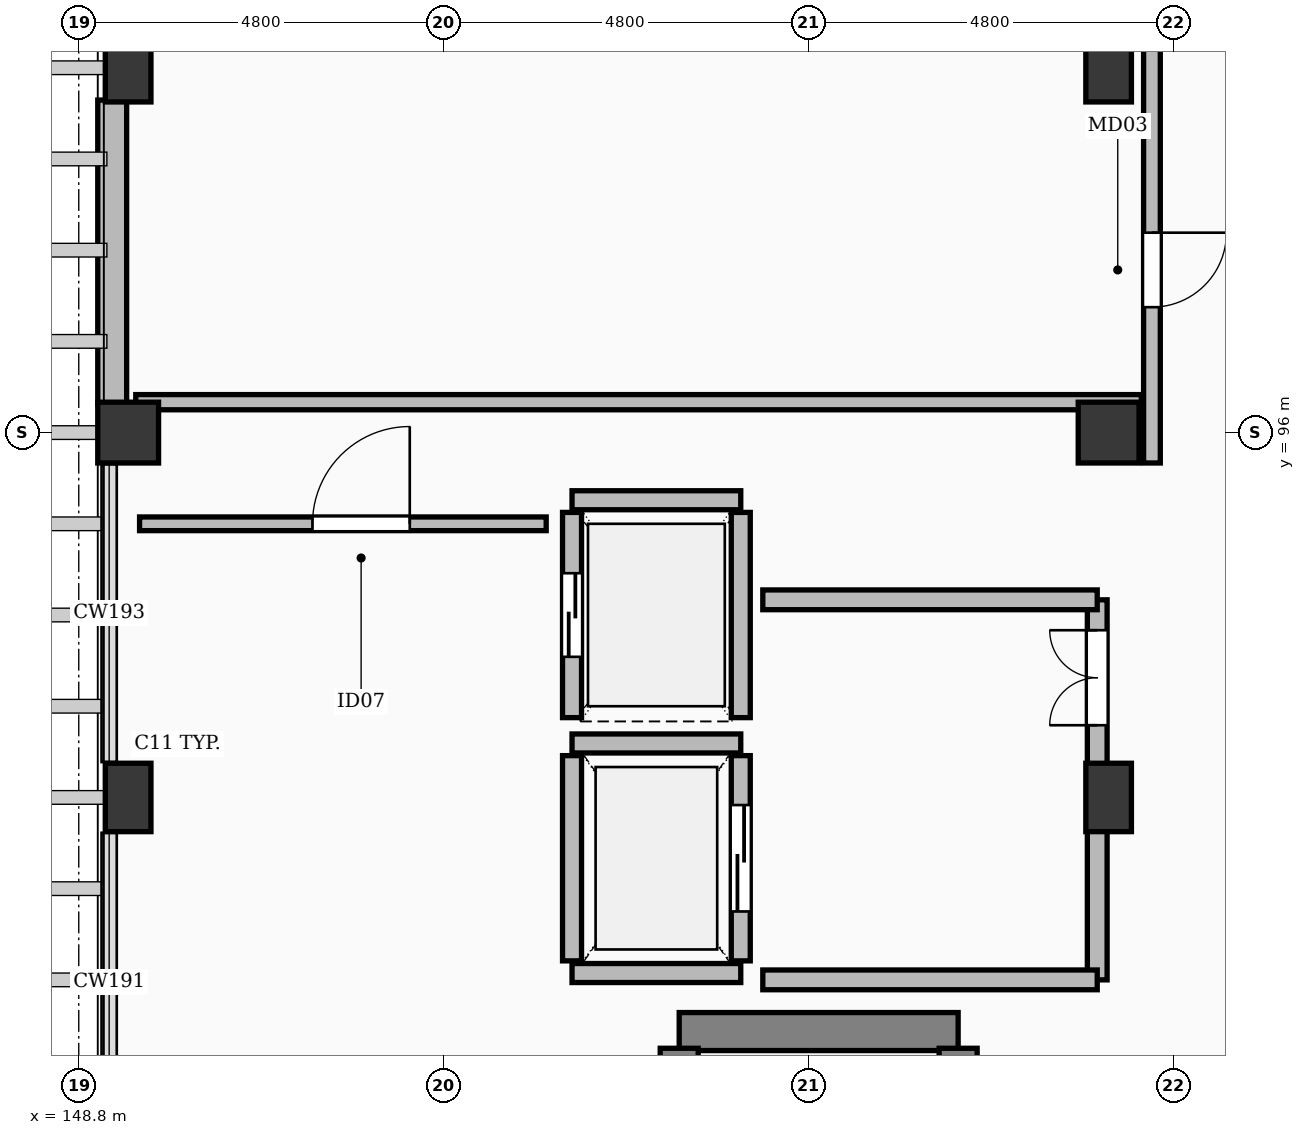
"""IFC4 building model, lengths in metres.
Left out: names, types, materials, properties, quantities, classifications, styles, units other than length and angle.
Written with IfcOpenShell. Run it as: python <this file> out.ifc"""

import sys

from ifc_helpers import new_model, si_unit, direction, frame, frame_2d, origin, origin_2d, place, context, subcontext, project, spatial, rectangle, extrude, element, fill, save


model = new_model("IFC4")
c1 = context("Model", 3, precision=1e-05, world=origin(), true_north=direction((0.0, 1.0)))
c2 = subcontext(c1, "Body", "Model", "MODEL_VIEW")
j1 = project(units=[si_unit("LENGTHUNIT", "METRE"), si_unit("PLANEANGLEUNIT", "RADIAN")], contexts=[c1])
p1 = place(None, origin())
s1 = spatial("IfcSite", under=j1, at=p1, CompositionType="ELEMENT")
p2 = place(p1, origin())
s2 = spatial("IfcBuilding", under=s1, at=p2, CompositionType="ELEMENT")
p3 = place(p2, frame((0.0, 0.0, 21.0)))
s3 = spatial("IfcBuildingStorey", under=s2, at=p3, CompositionType="ELEMENT", Elevation=21.0)
for number, where, z_axis, x_axis in (
    (1, (149.45, 96.0, 0.0), (0.0, 0.0, 1.0), (1.0, 0.0, 0.0)),
    (2, (162.35, 96.0, 0.0), (0.0, 0.0, 1.0), (1.0, 0.0, 0.0)),
):
    element("IfcColumn", number, at=place(p3, frame(where, z_axis=z_axis, x_axis=x_axis)), inside=s3, PredefinedType="COLUMN", context=c2, shape_type="SweptSolid", body=[
        extrude(rectangle(XDim=0.8, YDim=0.8, at=origin_2d()), origin(), (0.0, 0.0, 1.0), 3.6),
    ])
for number, where, z_axis, x_axis in (
    (3, (149.45, 91.2, -0.26), (0.0, 0.0, 1.0), (1.0, 0.0, 0.0)),
    (4, (149.45, 100.8, -0.26), (0.0, 0.0, 1.0), (1.0, 0.0, 0.0)),
    (5, (162.35, 91.2, -0.26), (0.0, 0.0, 1.0), (1.0, 0.0, 0.0)),
    (6, (162.35, 100.8, -0.26), (0.0, 0.0, 1.0), (1.0, 0.0, 0.0)),
):
    element("IfcColumn", number, at=place(p3, frame(where, z_axis=z_axis, x_axis=x_axis)), inside=s3, PredefinedType="COLUMN", context=c2, shape_type="SweptSolid", body=[
        extrude(rectangle(XDim=0.6, YDim=0.9, at=origin_2d()), origin(), (0.0, 0.0, 1.0), 3.86),
    ])
p4 = place(p3, frame((149.24, 96.375, 0.0), z_axis=(0.0, 0.0, 1.0), x_axis=(0.0, 1.0, 0.0)))
e7 = element("IfcWall", 7, at=p4, inside=s3, PredefinedType="SOLIDWALL", context=c2, shape_type="SweptSolid", body=[
    extrude(rectangle(XDim=4.0, YDim=0.38, at=frame_2d((2.0, 0.0))), origin(), (0.0, 0.0, 1.0), 2.652),
])
p5 = place(p3, frame((156.7, 88.12, 0.0), z_axis=(0.0, 0.0, 1.0), x_axis=(1.0, 0.0, 0.0)))
e8 = element("IfcWall", 8, at=p5, inside=s3, PredefinedType="SHEAR", context=c2, shape_type="SweptSolid", body=[
    extrude(rectangle(XDim=3.67, YDim=0.5, at=frame_2d((1.835, 0.0))), origin(), (0.0, 0.0, 1.0), 3.34),
])
p6 = place(p3, frame((156.7, 77.4, 0.0), z_axis=(0.0, 0.0, 1.0), x_axis=(0.0, 1.0, 0.0)))
e9 = element("IfcWall", 9, at=p6, inside=s3, PredefinedType="SHEAR", context=c2, shape_type="SweptSolid", body=[
    extrude(rectangle(XDim=10.5, YDim=0.5, at=frame_2d((5.25, 0.0))), origin(), (0.0, 0.0, 1.0), 3.34),
])
p7 = place(p3, frame((160.37, 77.4, 0.0), z_axis=(0.0, 0.0, 1.0), x_axis=(0.0, 1.0, 0.0)))
e10 = element("IfcWall", 10, at=p7, inside=s3, PredefinedType="SHEAR", context=c2, shape_type="SweptSolid", body=[
    extrude(rectangle(XDim=10.5, YDim=0.5, at=frame_2d((5.25, 0.0))), origin(), (0.0, 0.0, 1.0), 3.34),
])
p8 = place(p7, frame((0.45, 0.0, 0.0)))
e11 = element("IfcOpeningElement", 11, at=p8, cuts=e10, PredefinedType="OPENING", context=c2, shape_type="SweptSolid", body=[
    extrude(rectangle(XDim=1.3, YDim=2.15, at=frame_2d((0.65, 1.075))), frame((0.0, 0.262, 0.0), z_axis=(0.0, -1.0, 0.0), x_axis=(1.0, 0.0, 0.0)), (0.0, 0.0, 1.0), 0.524),
])
for number, where, z_axis, x_axis in (
    (12, (155.29, 88.89, 0.0), (0.0, 0.0, 1.0), (1.0, 0.0, 0.0)),
    (13, (155.29, 91.91, 0.0), (0.0, 0.0, 1.0), (1.0, 0.0, 0.0)),
):
    element("IfcWall", number, at=place(p3, frame(where, z_axis=z_axis, x_axis=x_axis)), inside=s3, PredefinedType="SOLIDWALL", context=c2, shape_type="SweptSolid", body=[
        extrude(rectangle(XDim=2.22, YDim=0.25, at=frame_2d((1.11, 0.0))), origin(), (0.0, 0.0, 1.0), 3.34),
    ])
p9 = place(p3, frame((155.29, 89.05, 0.0), z_axis=(0.0, 0.0, 1.0), x_axis=(0.0, 1.0, 0.0)))
e14 = element("IfcWall", 14, at=p9, inside=s3, PredefinedType="SOLIDWALL", context=c2, shape_type="SweptSolid", body=[
    extrude(rectangle(XDim=2.7, YDim=0.25, at=frame_2d((1.35, 0.0))), origin(), (0.0, 0.0, 1.0), 2.652),
])
p10 = place(p3, frame((157.51, 89.05, 0.0), z_axis=(0.0, 0.0, 1.0), x_axis=(0.0, 1.0, 0.0)))
e15 = element("IfcWall", 15, at=p10, inside=s3, PredefinedType="SOLIDWALL", context=c2, shape_type="SweptSolid", body=[
    extrude(rectangle(XDim=2.7, YDim=0.25, at=frame_2d((1.35, 0.0))), origin(), (0.0, 0.0, 1.0), 2.652),
])
p11 = place(p10, frame((0.65, 0.0, 0.0)))
e16 = element("IfcOpeningElement", 16, at=p11, cuts=e15, PredefinedType="OPENING", context=c2, shape_type="SweptSolid", body=[
    extrude(rectangle(XDim=1.4, YDim=2.3, at=frame_2d((0.7, 1.15))), frame((0.0, 0.137, 0.0), z_axis=(0.0, -1.0, 0.0), x_axis=(1.0, 0.0, 0.0)), (0.0, 0.0, 1.0), 0.274),
])
p12 = place(p3, frame((155.29, 95.11, 0.0), z_axis=(0.0, 0.0, 1.0), x_axis=(1.0, 0.0, 0.0)))
e17 = element("IfcWall", 17, at=p12, inside=s3, PredefinedType="SOLIDWALL", context=c2, shape_type="SweptSolid", body=[
    extrude(rectangle(XDim=2.22, YDim=0.25, at=frame_2d((1.11, 0.0))), origin(), (0.0, 0.0, 1.0), 3.34),
])
p13 = place(p3, frame((155.29, 92.25, 0.0), z_axis=(0.0, 0.0, 1.0), x_axis=(0.0, 1.0, 0.0)))
e18 = element("IfcWall", 18, at=p13, inside=s3, PredefinedType="SOLIDWALL", context=c2, shape_type="SweptSolid", body=[
    extrude(rectangle(XDim=2.7, YDim=0.25, at=frame_2d((1.35, 0.0))), origin(), (0.0, 0.0, 1.0), 3.34),
])
p14 = place(p13, frame((0.8, 0.0, 0.0)))
e19 = element("IfcOpeningElement", 19, at=p14, cuts=e18, PredefinedType="OPENING", context=c2, shape_type="SweptSolid", body=[
    extrude(rectangle(XDim=1.1, YDim=2.2, at=frame_2d((0.55, 1.1))), frame((0.0, 0.137, 0.0), z_axis=(0.0, -1.0, 0.0), x_axis=(1.0, 0.0, 0.0)), (0.0, 0.0, 1.0), 0.274),
])
p15 = place(p3, frame((157.51, 92.25, 0.0), z_axis=(0.0, 0.0, 1.0), x_axis=(0.0, 1.0, 0.0)))
e20 = element("IfcWall", 20, at=p15, inside=s3, PredefinedType="SOLIDWALL", context=c2, shape_type="SweptSolid", body=[
    extrude(rectangle(XDim=2.7, YDim=0.25, at=frame_2d((1.35, 0.0))), origin(), (0.0, 0.0, 1.0), 3.34),
])
p16 = place(p3, frame((162.2, 88.8, 0.0), z_axis=(0.0, 0.0, 1.0), x_axis=(0.0, 1.0, 0.0)))
e21 = element("IfcWall", 21, at=p16, inside=s3, PredefinedType="SOLIDWALL", context=c2, shape_type="SweptSolid", body=[
    extrude(rectangle(XDim=5.0, YDim=0.26, at=frame_2d((2.5, 0.0))), origin(), (0.0, 0.0, 1.0), 2.652),
])
p17 = place(p16, frame((3.35, 0.0, 0.0)))
e22 = element("IfcOpeningElement", 22, at=p17, cuts=e21, PredefinedType="OPENING", context=c2, shape_type="SweptSolid", body=[
    extrude(rectangle(XDim=1.25, YDim=2.15, at=frame_2d((0.625, 1.075))), frame((0.0, 0.142, 0.0), z_axis=(0.0, -1.0, 0.0), x_axis=(1.0, 0.0, 0.0)), (0.0, 0.0, 1.0), 0.284),
])
for number, where, z_axis, x_axis in (
    (23, (157.8, 88.8, 0.0), (0.0, 0.0, 1.0), (1.0, 0.0, 0.0)),
    (24, (157.8, 93.8, 0.0), (0.0, 0.0, 1.0), (1.0, 0.0, 0.0)),
):
    element("IfcWall", number, at=place(p3, frame(where, z_axis=z_axis, x_axis=x_axis)), inside=s3, PredefinedType="SOLIDWALL", context=c2, shape_type="SweptSolid", body=[
        extrude(rectangle(XDim=4.4, YDim=0.26, at=frame_2d((2.2, 0.0))), origin(), (0.0, 0.0, 1.0), 2.652),
    ])
p18 = place(p3, frame((162.92, 95.6, 0.0), z_axis=(0.0, 0.0, 1.0), x_axis=(0.0, 1.0, 0.0)))
e25 = element("IfcWall", 25, at=p18, inside=s3, PredefinedType="PARTITIONING", context=c2, shape_type="SweptSolid", body=[
    extrude(rectangle(XDim=7.22, YDim=0.22, at=frame_2d((3.61, 0.0))), origin(), (0.0, 0.0, 1.0), 2.652),
])
p19 = place(p18, frame((2.05, 0.0, 0.0)))
e26 = element("IfcOpeningElement", 26, at=p19, cuts=e25, PredefinedType="OPENING", context=c2, shape_type="SweptSolid", body=[
    extrude(rectangle(XDim=0.98, YDim=2.15, at=frame_2d((0.49, 1.075))), frame((0.0, 0.122, 0.0), z_axis=(0.0, -1.0, 0.0), x_axis=(1.0, 0.0, 0.0)), (0.0, 0.0, 1.0), 0.244),
])
p20 = place(p18, frame((5.9, 0.0, 0.0)))
e27 = element("IfcOpeningElement", 27, at=p20, cuts=e25, PredefinedType="OPENING", context=c2, shape_type="SweptSolid", body=[
    extrude(rectangle(XDim=1.02, YDim=2.2, at=frame_2d((0.51, 1.1))), frame((0.0, 0.122, 0.0), z_axis=(0.0, -1.0, 0.0), x_axis=(1.0, 0.0, 0.0)), (0.0, 0.0, 1.0), 0.244),
])
p21 = place(p3, frame((149.55, 96.4, 0.0), z_axis=(0.0, 0.0, 1.0), x_axis=(1.0, 0.0, 0.0)))
e28 = element("IfcWall", 28, at=p21, inside=s3, PredefinedType="PARTITIONING", context=c2, shape_type="SweptSolid", body=[
    extrude(rectangle(XDim=13.23, YDim=0.2, at=frame_2d((6.615, 0.0))), origin(), (0.0, 0.0, 1.0), 2.652),
])
p22 = place(p3, frame((149.6, 94.8, 0.0), z_axis=(0.0, 0.0, 1.0), x_axis=(1.0, 0.0, 0.0)))
e29 = element("IfcWall", 29, at=p22, inside=s3, PredefinedType="PARTITIONING", context=c2, shape_type="SweptSolid", body=[
    extrude(rectangle(XDim=5.35, YDim=0.18, at=frame_2d((2.675, 0.0))), origin(), (0.0, 0.0, 1.0), 2.652),
])
p23 = place(p22, frame((2.275, 0.0, 0.0)))
e30 = element("IfcOpeningElement", 30, at=p23, cuts=e29, PredefinedType="OPENING", context=c2, shape_type="SweptSolid", body=[
    extrude(rectangle(XDim=1.28, YDim=2.16, at=frame_2d((0.64, 1.08))), frame((0.0, 0.102, 0.0), z_axis=(0.0, -1.0, 0.0), x_axis=(1.0, 0.0, 0.0)), (0.0, 0.0, 1.0), 0.204),
])
p24 = place(p11, origin())
e31 = element("IfcDoor", 31, at=p24, inside=s3, OperationType="SLIDING_TO_LEFT", PredefinedType="DOOR", context=c2, shape_type="SweptSolid", body=[
    extrude(rectangle(XDim=1.4, YDim=2.3, at=frame_2d((0.7, 1.15))), frame((0.0, 0.025, 0.0), z_axis=(0.0, -1.0, 0.0), x_axis=(1.0, 0.0, 0.0)), (0.0, 0.0, 1.0), 0.05),
])
fill(e16, e31)
p25 = place(p14, origin())
e32 = element("IfcDoor", 32, at=p25, inside=s3, OperationType="SLIDING_TO_LEFT", PredefinedType="DOOR", context=c2, shape_type="SweptSolid", body=[
    extrude(rectangle(XDim=1.1, YDim=2.2, at=frame_2d((0.55, 1.1))), frame((0.0, 0.025, 0.0), z_axis=(0.0, -1.0, 0.0), x_axis=(1.0, 0.0, 0.0)), (0.0, 0.0, 1.0), 0.05),
])
fill(e19, e32)
p26 = place(p17, origin())
e33 = element("IfcDoor", 33, at=p26, inside=s3, OperationType="DOUBLE_DOOR_SINGLE_SWING", PredefinedType="DOOR", context=c2, shape_type="SweptSolid", body=[
    extrude(rectangle(XDim=1.25, YDim=2.15, at=frame_2d((0.625, 1.075))), frame((0.0, 0.025, 0.0), z_axis=(0.0, -1.0, 0.0), x_axis=(1.0, 0.0, 0.0)), (0.0, 0.0, 1.0), 0.05),
])
fill(e22, e33)
p27 = place(p19, frame((0.98, 0.0, 0.0), z_axis=(0.0, 0.0, 1.0), x_axis=(-1.0, 0.0, 0.0)))
e34 = element("IfcDoor", 34, at=p27, inside=s3, OperationType="SINGLE_SWING_RIGHT", PredefinedType="DOOR", context=c2, shape_type="SweptSolid", body=[
    extrude(rectangle(XDim=0.98, YDim=2.15, at=frame_2d((0.49, 1.075))), frame((0.0, 0.025, 0.0), z_axis=(0.0, -1.0, 0.0), x_axis=(1.0, 0.0, 0.0)), (0.0, 0.0, 1.0), 0.05),
])
fill(e26, e34)
p28 = place(p23, origin())
e35 = element("IfcDoor", 35, at=p28, inside=s3, OperationType="SINGLE_SWING_RIGHT", PredefinedType="DOOR", context=c2, shape_type="SweptSolid", body=[
    extrude(rectangle(XDim=1.28, YDim=2.16, at=frame_2d((0.64, 1.08))), frame((0.0, 0.025, 0.0), z_axis=(0.0, -1.0, 0.0), x_axis=(1.0, 0.0, 0.0)), (0.0, 0.0, 1.0), 0.05),
])
fill(e30, e35)
save(model, sys.argv[1])
